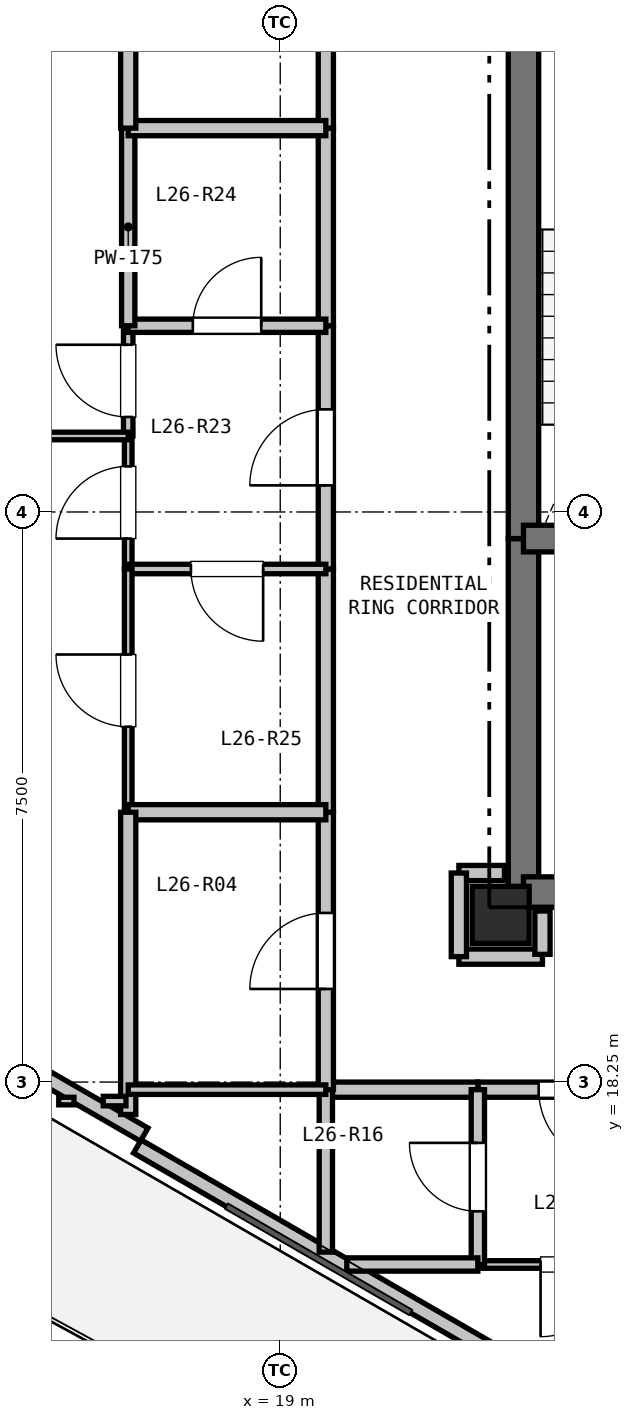
"""IFC4 building model, lengths in metres.
Left out: names, types, materials, properties, quantities, classifications, styles, units other than length and angle.
Written with IfcOpenShell. Run it as: python <this file> out.ifc"""

import sys

from ifc_helpers import new_model, si_unit, direction, frame, frame_2d, origin, origin_2d, place, context, subcontext, project, spatial, rectangle, extrude, element, fill, save


model = new_model("IFC4")
c1 = context("Model", 3, precision=1e-05, world=origin(), true_north=direction((0.0, 1.0)))
c2 = subcontext(c1, "Body", "Model", "MODEL_VIEW")
j1 = project(units=[si_unit("LENGTHUNIT", "METRE"), si_unit("PLANEANGLEUNIT", "RADIAN")], contexts=[c1])
p1 = place(None, origin())
s1 = spatial("IfcSite", under=j1, at=p1, CompositionType="ELEMENT")
p2 = place(p1, origin())
s2 = spatial("IfcBuilding", under=s1, at=p2, CompositionType="ELEMENT")
p3 = place(p2, frame((0.0, 0.0, 96.6)))
s3 = spatial("IfcBuildingStorey", under=s2, at=p3, CompositionType="ELEMENT", Elevation=96.6)
p4 = place(p3, frame((21.9, 20.45, 0.0), z_axis=(0.0, 0.0, 1.0), x_axis=(1.0, 0.0, 0.0)))
e1 = element("IfcColumn", 1, at=p4, inside=s3, PredefinedType="COLUMN", context=c2, shape_type="SweptSolid", body=[
    extrude(rectangle(XDim=0.75, YDim=0.75, at=origin_2d()), origin(), (0.0, 0.0, 1.0), 3.3),
])
p5 = place(p3, frame((26.845, 11.788, 0.0), z_axis=(0.0, 0.0, 1.0), x_axis=(-0.866027010039, 0.499997217876, 0.0)))
e2 = element("IfcWall", 2, at=p5, inside=s3, PredefinedType="PARAPET", context=c2, shape_type="SweptSolid", body=[
    extrude(rectangle(XDim=11.229, YDim=0.2, at=frame_2d((5.615, 0.0))), origin(), (0.0, 0.0, 1.0), 0.2),
])
p6 = place(p3, frame((17.21, 17.559, 0.0), z_axis=(0.0, 0.0, 1.0), x_axis=(-0.866025371046, 0.500000056704, 0.0)))
e3 = element("IfcWall", 3, at=p6, inside=s3, PredefinedType="PARAPET", context=c2, shape_type="SweptSolid", body=[
    extrude(rectangle(XDim=1.7, YDim=0.2, at=frame_2d((0.85, 0.0))), origin(), (0.0, 0.0, 1.0), 2.67),
])
p7 = place(p3, frame((22.2, 20.75, 0.0), z_axis=(0.0, 0.0, 1.0), x_axis=(0.0, 1.0, 0.0)))
e4 = element("IfcWall", 4, at=p7, inside=s3, PredefinedType="SHEAR", context=c2, shape_type="SweptSolid", body=[
    extrude(rectangle(XDim=4.65, YDim=0.4, at=frame_2d((2.325, 0.0))), origin(), (0.0, 0.0, 1.0), 3.05),
])
p8 = place(p3, frame((22.2, 25.4, 0.0), z_axis=(0.0, 0.0, 1.0), x_axis=(0.0, 1.0, 0.0)))
e5 = element("IfcWall", 5, at=p8, inside=s3, PredefinedType="SHEAR", context=c2, shape_type="SweptSolid", body=[
    extrude(rectangle(XDim=7.35, YDim=0.4, at=frame_2d((3.675, 0.0))), origin(), (0.0, 0.0, 1.0), 3.05),
])
p9 = place(p3, frame((25.65, 20.75, 0.0), z_axis=(0.0, 0.0, 1.0), x_axis=(-1.0, 0.0, 0.0)))
e6 = element("IfcWall", 6, at=p9, inside=s3, PredefinedType="SHEAR", context=c2, shape_type="SweptSolid", body=[
    extrude(rectangle(XDim=3.45, YDim=0.4, at=frame_2d((1.725, 0.0))), origin(), (0.0, 0.0, 1.0), 3.05),
])
p10 = place(p9, frame((0.65, 0.0, 0.0)))
e7 = element("IfcOpeningElement", 7, at=p10, cuts=e6, PredefinedType="OPENING", context=c2, shape_type="SweptSolid", body=[
    extrude(rectangle(XDim=1.15, YDim=2.15, at=frame_2d((0.575, 1.075))), frame((0.0, 0.21, 0.0), z_axis=(0.0, -1.0, 0.0), x_axis=(1.0, 0.0, 0.0)), (0.0, 0.0, 1.0), 0.42),
])
p11 = place(p3, frame((22.2, 25.4, 0.0), z_axis=(0.0, 0.0, 1.0), x_axis=(1.0, 0.0, 0.0)))
e8 = element("IfcWall", 8, at=p11, inside=s3, PredefinedType="SHEAR", context=c2, shape_type="SweptSolid", body=[
    extrude(rectangle(XDim=3.45, YDim=0.35, at=frame_2d((1.725, 0.0))), origin(), (0.0, 0.0, 1.0), 3.05),
])
p12 = place(p11, frame((1.15, 0.0, 0.0)))
e9 = element("IfcOpeningElement", 9, at=p12, cuts=e8, PredefinedType="OPENING", context=c2, shape_type="SweptSolid", body=[
    extrude(rectangle(XDim=1.15, YDim=2.15, at=frame_2d((0.575, 1.075))), frame((0.0, 0.185, 0.0), z_axis=(0.0, -1.0, 0.0), x_axis=(1.0, 0.0, 0.0)), (0.0, 0.0, 1.0), 0.37),
])
p13 = place(p3, frame((21.35, 19.9, 0.0), z_axis=(0.0, 0.0, 1.0), x_axis=(1.0, 0.0, 0.0)))
e10 = element("IfcWall", 10, at=p13, inside=s3, PredefinedType="PARTITIONING", context=c2, shape_type="SweptSolid", body=[
    extrude(rectangle(XDim=1.1, YDim=0.2, at=frame_2d((0.55, 0.0))), origin(), (0.0, 0.0, 1.0), 2.423),
])
p14 = place(p3, frame((22.45, 19.93, 0.0), z_axis=(0.0, 0.0, 1.0), x_axis=(0.0, 1.0, 0.0)))
e11 = element("IfcWall", 11, at=p14, inside=s3, PredefinedType="PARTITIONING", context=c2, shape_type="SweptSolid", body=[
    extrude(rectangle(XDim=0.57, YDim=0.2, at=frame_2d((0.285, 0.0))), origin(), (0.0, 0.0, 1.0), 2.423),
])
p15 = place(p3, frame((24.2, 18.15, 0.0), z_axis=(0.0, 0.0, 1.0), x_axis=(-1.0, 0.0, 0.0)))
e12 = element("IfcWall", 12, at=p15, inside=s3, PredefinedType="PARTITIONING", context=c2, shape_type="SweptSolid", body=[
    extrude(rectangle(XDim=2.6, YDim=0.2, at=frame_2d((1.3, 0.0))), origin(), (0.0, 0.0, 1.0), 2.423),
])
p16 = place(p15, frame((0.8, 0.0, 0.0)))
e13 = element("IfcOpeningElement", 13, at=p16, cuts=e12, PredefinedType="OPENING", context=c2, shape_type="SweptSolid", body=[
    extrude(rectangle(XDim=1.0, YDim=2.15, at=frame_2d((0.5, 1.075))), frame((0.0, 0.11, 0.0), z_axis=(0.0, -1.0, 0.0), x_axis=(1.0, 0.0, 0.0)), (0.0, 0.0, 1.0), 0.22),
])
p17 = place(p3, frame((21.6, 18.15, 0.0), z_axis=(0.0, 0.0, 1.0), x_axis=(-1.0, 0.0, 0.0)))
e14 = element("IfcWall", 14, at=p17, inside=s3, PredefinedType="PARTITIONING", context=c2, shape_type="SweptSolid", body=[
    extrude(rectangle(XDim=2.0, YDim=0.2, at=frame_2d((1.0, 0.0))), origin(), (0.0, 0.0, 1.0), 3.05),
])
p18 = place(p3, frame((19.6, 18.15, 0.0), z_axis=(0.0, 0.0, 1.0), x_axis=(0.0, 1.0, 0.0)))
e15 = element("IfcWall", 15, at=p18, inside=s3, PredefinedType="PARTITIONING", context=c2, shape_type="SweptSolid", body=[
    extrude(rectangle(XDim=3.65, YDim=0.2, at=frame_2d((1.825, 0.0))), origin(), (0.0, 0.0, 1.0), 2.423),
])
p19 = place(p18, frame((1.325, 0.0, 0.0)))
e16 = element("IfcOpeningElement", 16, at=p19, cuts=e15, PredefinedType="OPENING", context=c2, shape_type="SweptSolid", body=[
    extrude(rectangle(XDim=1.0, YDim=2.15, at=frame_2d((0.5, 1.075))), frame((0.0, 0.11, 0.0), z_axis=(0.0, -1.0, 0.0), x_axis=(1.0, 0.0, 0.0)), (0.0, 0.0, 1.0), 0.22),
])
p20 = place(p3, frame((19.6, 21.8, 0.0), z_axis=(0.0, 0.0, 1.0), x_axis=(0.0, 1.0, 0.0)))
e17 = element("IfcWall", 17, at=p20, inside=s3, PredefinedType="PARTITIONING", context=c2, shape_type="SweptSolid", body=[
    extrude(rectangle(XDim=3.2, YDim=0.2, at=frame_2d((1.6, 0.0))), origin(), (0.0, 0.0, 1.0), 3.05),
])
p21 = place(p3, frame((19.6, 25.0, 0.0), z_axis=(0.0, 0.0, 1.0), x_axis=(0.0, 1.0, 0.0)))
e18 = element("IfcWall", 18, at=p21, inside=s3, PredefinedType="PARTITIONING", context=c2, shape_type="SweptSolid", body=[
    extrude(rectangle(XDim=3.2, YDim=0.2, at=frame_2d((1.6, 0.0))), origin(), (0.0, 0.0, 1.0), 3.05),
])
p22 = place(p21, frame((1.1, 0.0, 0.0)))
e19 = element("IfcOpeningElement", 19, at=p22, cuts=e18, PredefinedType="OPENING", context=c2, shape_type="SweptSolid", body=[
    extrude(rectangle(XDim=1.0, YDim=2.15, at=frame_2d((0.5, 1.075))), frame((0.0, 0.11, 0.0), z_axis=(0.0, -1.0, 0.0), x_axis=(1.0, 0.0, 0.0)), (0.0, 0.0, 1.0), 0.22),
])
p23 = place(p3, frame((19.6, 28.2, 0.0), z_axis=(0.0, 0.0, 1.0), x_axis=(0.0, 1.0, 0.0)))
e20 = element("IfcWall", 20, at=p23, inside=s3, PredefinedType="PARTITIONING", context=c2, shape_type="SweptSolid", body=[
    extrude(rectangle(XDim=2.6, YDim=0.2, at=frame_2d((1.3, 0.0))), origin(), (0.0, 0.0, 1.0), 3.05),
])
p24 = place(p3, frame((19.6, 30.8, 0.0), z_axis=(0.0, 0.0, 1.0), x_axis=(0.0, 1.0, 0.0)))
e21 = element("IfcWall", 21, at=p24, inside=s3, PredefinedType="PARTITIONING", context=c2, shape_type="SweptSolid", body=[
    extrude(rectangle(XDim=4.55, YDim=0.2, at=frame_2d((2.275, 0.0))), origin(), (0.0, 0.0, 1.0), 2.423),
])
p25 = place(p24, frame((1.775, 0.0, 0.0)))
e22 = element("IfcOpeningElement", 22, at=p25, cuts=e21, PredefinedType="OPENING", context=c2, shape_type="SweptSolid", body=[
    extrude(rectangle(XDim=1.0, YDim=2.15, at=frame_2d((0.5, 1.075))), frame((0.0, 0.11, 0.0), z_axis=(0.0, -1.0, 0.0), x_axis=(1.0, 0.0, 0.0)), (0.0, 0.0, 1.0), 0.22),
])
p26 = place(p3, frame((21.95, 21.0, 0.0), z_axis=(0.0, 0.0, 1.0), x_axis=(-1.0, 0.0, 0.0)))
e23 = element("IfcWall", 23, at=p26, inside=s3, PredefinedType="PARTITIONING", context=c2, shape_type="SweptSolid", body=[
    extrude(rectangle(XDim=0.6, YDim=0.2, at=frame_2d((0.3, 0.0))), origin(), (0.0, 0.0, 1.0), 2.498),
])
p27 = place(p3, frame((21.35, 21.0, 0.0), z_axis=(0.0, 0.0, 1.0), x_axis=(0.0, -1.0, 0.0)))
e24 = element("IfcWall", 24, at=p27, inside=s3, PredefinedType="PARTITIONING", context=c2, shape_type="SweptSolid", body=[
    extrude(rectangle(XDim=1.1, YDim=0.2, at=frame_2d((0.55, 0.0))), origin(), (0.0, 0.0, 1.0), 2.423),
])
p28 = place(p3, frame((24.2, 15.85, 0.0), z_axis=(0.0, 0.0, 1.0), x_axis=(-1.0, 0.0, 0.0)))
e25 = element("IfcWall", 25, at=p28, inside=s3, PredefinedType="PARTITIONING", context=c2, shape_type="SweptSolid", body=[
    extrude(rectangle(XDim=2.6, YDim=0.1, at=frame_2d((1.3, 0.0))), origin(), (0.0, 0.0, 1.0), 3.05),
])
p29 = place(p28, frame((0.825, 0.0, 0.0)))
e26 = element("IfcOpeningElement", 26, at=p29, cuts=e25, PredefinedType="OPENING", context=c2, shape_type="SweptSolid", body=[
    extrude(rectangle(XDim=0.95, YDim=2.1, at=frame_2d((0.475, 1.05))), frame((0.0, 0.06, 0.0), z_axis=(0.0, -1.0, 0.0), x_axis=(1.0, 0.0, 0.0)), (0.0, 0.0, 1.0), 0.12),
])
p30 = place(p3, frame((21.6, 15.85, 0.0), z_axis=(0.0, 0.0, 1.0), x_axis=(0.0, 1.0, 0.0)))
e27 = element("IfcWall", 27, at=p30, inside=s3, PredefinedType="PLUMBINGWALL", context=c2, shape_type="SweptSolid", body=[
    extrude(rectangle(XDim=2.3, YDim=0.175, at=frame_2d((1.15, 0.0))), origin(), (0.0, 0.0, 1.0), 3.05),
])
p31 = place(p30, frame((0.7, 0.0, 0.0)))
e28 = element("IfcOpeningElement", 28, at=p31, cuts=e27, PredefinedType="OPENING", context=c2, shape_type="SweptSolid", body=[
    extrude(rectangle(XDim=0.9, YDim=2.1, at=frame_2d((0.45, 1.05))), frame((0.0, 0.097, 0.0), z_axis=(0.0, -1.0, 0.0), x_axis=(1.0, 0.0, 0.0)), (0.0, 0.0, 1.0), 0.195),
])
p32 = place(p3, frame((17.0, 25.0, 0.0), z_axis=(0.0, 0.0, 1.0), x_axis=(0.0, 1.0, 0.0)))
e29 = element("IfcWall", 29, at=p32, inside=s3, PredefinedType="PARTITIONING", context=c2, shape_type="SweptSolid", body=[
    extrude(rectangle(XDim=1.75, YDim=0.1, at=frame_2d((0.875, 0.0))), origin(), (0.0, 0.0, 1.0), 3.05),
])
p33 = place(p32, frame((0.4, 0.0, 0.0)))
e30 = element("IfcOpeningElement", 30, at=p33, cuts=e29, PredefinedType="OPENING", context=c2, shape_type="SweptSolid", body=[
    extrude(rectangle(XDim=0.95, YDim=2.1, at=frame_2d((0.475, 1.05))), frame((0.0, 0.06, 0.0), z_axis=(0.0, -1.0, 0.0), x_axis=(1.0, 0.0, 0.0)), (0.0, 0.0, 1.0), 0.12),
])
p34 = place(p3, frame((17.0, 26.75, 0.0), z_axis=(0.0, 0.0, 1.0), x_axis=(0.0, 1.0, 0.0)))
e31 = element("IfcWall", 31, at=p34, inside=s3, PredefinedType="PARTITIONING", context=c2, shape_type="SweptSolid", body=[
    extrude(rectangle(XDim=1.45, YDim=0.125, at=frame_2d((0.725, 0.0))), origin(), (0.0, 0.0, 1.0), 3.05),
])
p35 = place(p34, frame((0.25, 0.0, 0.0)))
e32 = element("IfcOpeningElement", 32, at=p35, cuts=e31, PredefinedType="OPENING", context=c2, shape_type="SweptSolid", body=[
    extrude(rectangle(XDim=0.95, YDim=2.1, at=frame_2d((0.475, 1.05))), frame((0.0, 0.073, 0.0), z_axis=(0.0, -1.0, 0.0), x_axis=(1.0, 0.0, 0.0)), (0.0, 0.0, 1.0), 0.145),
])
p36 = place(p3, frame((17.0, 28.2, 0.0), z_axis=(0.0, 0.0, 1.0), x_axis=(1.0, 0.0, 0.0)))
e33 = element("IfcWall", 33, at=p36, inside=s3, PredefinedType="PLUMBINGWALL", context=c2, shape_type="SweptSolid", body=[
    extrude(rectangle(XDim=2.6, YDim=0.175, at=frame_2d((1.3, 0.0))), origin(), (0.0, 0.0, 1.0), 3.05),
])
p37 = place(p36, frame((0.85, 0.0, 0.0)))
e34 = element("IfcOpeningElement", 34, at=p37, cuts=e33, PredefinedType="OPENING", context=c2, shape_type="SweptSolid", body=[
    extrude(rectangle(XDim=0.9, YDim=2.1, at=frame_2d((0.45, 1.05))), frame((0.0, 0.097, 0.0), z_axis=(0.0, -1.0, 0.0), x_axis=(1.0, 0.0, 0.0)), (0.0, 0.0, 1.0), 0.195),
])
p38 = place(p3, frame((19.6, 25.0, 0.0), z_axis=(0.0, 0.0, 1.0), x_axis=(-1.0, 0.0, 0.0)))
e35 = element("IfcWall", 35, at=p38, inside=s3, PredefinedType="PARTITIONING", context=c2, shape_type="SweptSolid", body=[
    extrude(rectangle(XDim=2.6, YDim=0.125, at=frame_2d((1.3, 0.0))), origin(), (0.0, 0.0, 1.0), 3.05),
])
p39 = place(p38, frame((0.825, 0.0, 0.0)))
e36 = element("IfcOpeningElement", 36, at=p39, cuts=e35, PredefinedType="OPENING", context=c2, shape_type="SweptSolid", body=[
    extrude(rectangle(XDim=0.95, YDim=2.1, at=frame_2d((0.475, 1.05))), frame((0.0, 0.073, 0.0), z_axis=(0.0, -1.0, 0.0), x_axis=(1.0, 0.0, 0.0)), (0.0, 0.0, 1.0), 0.145),
])
p40 = place(p3, frame((21.6, 15.85, 0.0), z_axis=(0.0, 0.0, 1.0), x_axis=(-1.0, 0.0, 0.0)))
e37 = element("IfcWall", 37, at=p40, inside=s3, PredefinedType="PLUMBINGWALL", context=c2, shape_type="SweptSolid", body=[
    extrude(rectangle(XDim=1.725, YDim=0.175, at=frame_2d((0.862, 0.0))), origin(), (0.0, 0.0, 1.0), 2.365),
])
p41 = place(p3, frame((19.6, 16.013, 0.0), z_axis=(0.0, 0.0, 1.0), x_axis=(0.0, 1.0, 0.0)))
e38 = element("IfcWall", 38, at=p41, inside=s3, PredefinedType="PLUMBINGWALL", context=c2, shape_type="SweptSolid", body=[
    extrude(rectangle(XDim=2.137, YDim=0.175, at=frame_2d((1.068, 0.0))), origin(), (0.0, 0.0, 1.0), 2.365),
])
p42 = place(p3, frame((17.0, 28.2, 0.0), z_axis=(0.0, 0.0, 1.0), x_axis=(0.0, 1.0, 0.0)))
e39 = element("IfcWall", 39, at=p42, inside=s3, PredefinedType="PLUMBINGWALL", context=c2, shape_type="SweptSolid", body=[
    extrude(rectangle(XDim=2.6, YDim=0.175, at=frame_2d((1.3, 0.0))), origin(), (0.0, 0.0, 1.0), 3.05),
])
p43 = place(p3, frame((17.0, 30.8, 0.0), z_axis=(0.0, 0.0, 1.0), x_axis=(1.0, 0.0, 0.0)))
e40 = element("IfcWall", 40, at=p43, inside=s3, PredefinedType="PARTITIONING", context=c2, shape_type="SweptSolid", body=[
    extrude(rectangle(XDim=2.6, YDim=0.2, at=frame_2d((1.3, 0.0))), origin(), (0.0, 0.0, 1.0), 3.05),
])
p44 = place(p3, frame((17.0, 21.8, 0.0), z_axis=(0.0, 0.0, 1.0), x_axis=(0.0, 1.0, 0.0)))
e41 = element("IfcWall", 41, at=p44, inside=s3, PredefinedType="PARTITIONING", context=c2, shape_type="SweptSolid", body=[
    extrude(rectangle(XDim=3.2, YDim=0.1, at=frame_2d((1.6, 0.0))), origin(), (0.0, 0.0, 1.0), 2.423),
])
p45 = place(p44, frame((1.125, 0.0, 0.0)))
e42 = element("IfcOpeningElement", 42, at=p45, cuts=e41, PredefinedType="OPENING", context=c2, shape_type="SweptSolid", body=[
    extrude(rectangle(XDim=0.95, YDim=2.1, at=frame_2d((0.475, 1.05))), frame((0.0, 0.06, 0.0), z_axis=(0.0, -1.0, 0.0), x_axis=(1.0, 0.0, 0.0)), (0.0, 0.0, 1.0), 0.12),
])
p46 = place(p3, frame((19.6, 21.8, 0.0), z_axis=(0.0, 0.0, 1.0), x_axis=(-1.0, 0.0, 0.0)))
e43 = element("IfcWall", 43, at=p46, inside=s3, PredefinedType="PARTITIONING", context=c2, shape_type="SweptSolid", body=[
    extrude(rectangle(XDim=2.6, YDim=0.2, at=frame_2d((1.3, 0.0))), origin(), (0.0, 0.0, 1.0), 2.423),
])
p47 = place(p3, frame((17.0, 30.8, 0.0), z_axis=(0.0, 0.0, 1.0), x_axis=(0.0, 1.0, 0.0)))
e44 = element("IfcWall", 44, at=p47, inside=s3, PredefinedType="PARTITIONING", context=c2, shape_type="SweptSolid", body=[
    extrude(rectangle(XDim=4.55, YDim=0.2, at=frame_2d((2.275, 0.0))), origin(), (0.0, 0.0, 1.0), 2.365),
])
p48 = place(p3, frame((17.0, 17.823, 0.0), z_axis=(0.0, 0.0, 1.0), x_axis=(0.0, 1.0, 0.0)))
e45 = element("IfcWall", 45, at=p48, inside=s3, PredefinedType="PARTITIONING", context=c2, shape_type="SweptSolid", body=[
    extrude(rectangle(XDim=3.977, YDim=0.2, at=frame_2d((1.988, 0.0))), origin(), (0.0, 0.0, 1.0), 2.365),
])
p49 = place(p3, frame((19.6, 18.15, 0.0), z_axis=(0.0, 0.0, 1.0), x_axis=(-1.0, 0.0, 0.0)))
e46 = element("IfcWall", 46, at=p49, inside=s3, PredefinedType="PARTITIONING", context=c2, shape_type="SweptSolid", body=[
    extrude(rectangle(XDim=2.6, YDim=0.125, at=frame_2d((1.3, 0.0))), origin(), (0.0, 0.0, 1.0), 2.365),
])
p50 = place(p3, frame((17.0, 26.75, 0.0), z_axis=(0.0, 0.0, 1.0), x_axis=(-1.0, 0.0, 0.0)))
e47 = element("IfcWall", 47, at=p50, inside=s3, PredefinedType="PARTITIONING", context=c2, shape_type="SweptSolid", body=[
    extrude(rectangle(XDim=5.91, YDim=0.1, at=frame_2d((2.955, 0.0))), origin(), (0.0, 0.0, 1.0), 3.05),
])
p51 = place(p50, frame((2.48, 0.0, 0.0)))
e48 = element("IfcOpeningElement", 48, at=p51, cuts=e47, PredefinedType="OPENING", context=c2, shape_type="SweptSolid", body=[
    extrude(rectangle(XDim=0.95, YDim=2.1, at=frame_2d((0.475, 1.05))), frame((0.0, 0.06, 0.0), z_axis=(0.0, -1.0, 0.0), x_axis=(1.0, 0.0, 0.0)), (0.0, 0.0, 1.0), 0.12),
])
p52 = place(p3, frame((16.97, 18.0, 0.0), z_axis=(0.0, 0.0, 1.0), x_axis=(-1.0, 0.0, 0.0)))
e49 = element("IfcWall", 49, at=p52, inside=s3, PredefinedType="PARTITIONING", context=c2, shape_type="SweptSolid", body=[
    extrude(rectangle(XDim=0.298, YDim=0.125, at=frame_2d((0.149, 0.0))), origin(), (0.0, 0.0, 1.0), 2.714),
])
p53 = place(p3, frame((16.286, 18.0, 0.0), z_axis=(0.0, 0.0, 1.0), x_axis=(-1.0, 0.0, 0.0)))
e50 = element("IfcWall", 50, at=p53, inside=s3, PredefinedType="PARTITIONING", context=c2, shape_type="SweptSolid", body=[
    extrude(rectangle(XDim=0.2, YDim=0.1, at=frame_2d((0.1, 0.0))), origin(), (0.0, 0.0, 1.0), 3.05),
])
p54 = place(p16, origin())
e51 = element("IfcDoor", 51, at=p54, inside=s3, OperationType="SINGLE_SWING_LEFT", PredefinedType="DOOR", context=c2, shape_type="SweptSolid", body=[
    extrude(rectangle(XDim=1.0, YDim=2.15, at=frame_2d((0.5, 1.075))), frame((0.0, 0.025, 0.0), z_axis=(0.0, -1.0, 0.0), x_axis=(1.0, 0.0, 0.0)), (0.0, 0.0, 1.0), 0.05),
])
fill(e13, e51)
p55 = place(p22, origin())
e52 = element("IfcDoor", 52, at=p55, inside=s3, OperationType="SINGLE_SWING_LEFT", PredefinedType="DOOR", context=c2, shape_type="SweptSolid", body=[
    extrude(rectangle(XDim=1.0, YDim=2.15, at=frame_2d((0.5, 1.075))), frame((0.0, 0.025, 0.0), z_axis=(0.0, -1.0, 0.0), x_axis=(1.0, 0.0, 0.0)), (0.0, 0.0, 1.0), 0.05),
])
fill(e19, e52)
p56 = place(p19, origin())
e53 = element("IfcDoor", 53, at=p56, inside=s3, OperationType="SINGLE_SWING_LEFT", PredefinedType="DOOR", context=c2, shape_type="SweptSolid", body=[
    extrude(rectangle(XDim=1.0, YDim=2.15, at=frame_2d((0.5, 1.075))), frame((0.0, 0.025, 0.0), z_axis=(0.0, -1.0, 0.0), x_axis=(1.0, 0.0, 0.0)), (0.0, 0.0, 1.0), 0.05),
])
fill(e16, e53)
p57 = place(p31, origin())
e54 = element("IfcDoor", 54, at=p57, inside=s3, OperationType="SINGLE_SWING_RIGHT", PredefinedType="DOOR", context=c2, shape_type="SweptSolid", body=[
    extrude(rectangle(XDim=0.9, YDim=2.1, at=frame_2d((0.45, 1.05))), frame((0.0, 0.025, 0.0), z_axis=(0.0, -1.0, 0.0), x_axis=(1.0, 0.0, 0.0)), (0.0, 0.0, 1.0), 0.05),
])
fill(e28, e54)
p58 = place(p29, origin())
e55 = element("IfcDoor", 55, at=p58, inside=s3, OperationType="SINGLE_SWING_RIGHT", PredefinedType="DOOR", context=c2, shape_type="SweptSolid", body=[
    extrude(rectangle(XDim=0.95, YDim=2.1, at=frame_2d((0.475, 1.05))), frame((0.0, 0.025, 0.0), z_axis=(0.0, -1.0, 0.0), x_axis=(1.0, 0.0, 0.0)), (0.0, 0.0, 1.0), 0.05),
])
fill(e26, e55)
p59 = place(p37, origin())
e56 = element("IfcDoor", 56, at=p59, inside=s3, OperationType="SINGLE_SWING_RIGHT", PredefinedType="DOOR", context=c2, shape_type="SweptSolid", body=[
    extrude(rectangle(XDim=0.9, YDim=2.1, at=frame_2d((0.45, 1.05))), frame((0.0, 0.025, 0.0), z_axis=(0.0, -1.0, 0.0), x_axis=(1.0, 0.0, 0.0)), (0.0, 0.0, 1.0), 0.05),
])
fill(e34, e56)
p60 = place(p39, origin())
e57 = element("IfcDoor", 57, at=p60, inside=s3, OperationType="SINGLE_SWING_LEFT", PredefinedType="DOOR", context=c2, shape_type="SweptSolid", body=[
    extrude(rectangle(XDim=0.95, YDim=2.1, at=frame_2d((0.475, 1.05))), frame((0.0, 0.025, 0.0), z_axis=(0.0, -1.0, 0.0), x_axis=(1.0, 0.0, 0.0)), (0.0, 0.0, 1.0), 0.05),
])
fill(e36, e57)
p61 = place(p35, origin())
e58 = element("IfcDoor", 58, at=p61, inside=s3, OperationType="SINGLE_SWING_RIGHT", PredefinedType="DOOR", context=c2, shape_type="SweptSolid", body=[
    extrude(rectangle(XDim=0.95, YDim=2.1, at=frame_2d((0.475, 1.05))), frame((0.0, 0.025, 0.0), z_axis=(0.0, -1.0, 0.0), x_axis=(1.0, 0.0, 0.0)), (0.0, 0.0, 1.0), 0.05),
])
fill(e32, e58)
p62 = place(p33, origin())
e59 = element("IfcDoor", 59, at=p62, inside=s3, OperationType="SINGLE_SWING_LEFT", PredefinedType="DOOR", context=c2, shape_type="SweptSolid", body=[
    extrude(rectangle(XDim=0.95, YDim=2.1, at=frame_2d((0.475, 1.05))), frame((0.0, 0.025, 0.0), z_axis=(0.0, -1.0, 0.0), x_axis=(1.0, 0.0, 0.0)), (0.0, 0.0, 1.0), 0.05),
])
fill(e30, e59)
p63 = place(p45, origin())
e60 = element("IfcDoor", 60, at=p63, inside=s3, OperationType="SINGLE_SWING_RIGHT", PredefinedType="DOOR", context=c2, shape_type="SweptSolid", body=[
    extrude(rectangle(XDim=0.95, YDim=2.1, at=frame_2d((0.475, 1.05))), frame((0.0, 0.025, 0.0), z_axis=(0.0, -1.0, 0.0), x_axis=(1.0, 0.0, 0.0)), (0.0, 0.0, 1.0), 0.05),
])
fill(e42, e60)
save(model, sys.argv[1])
